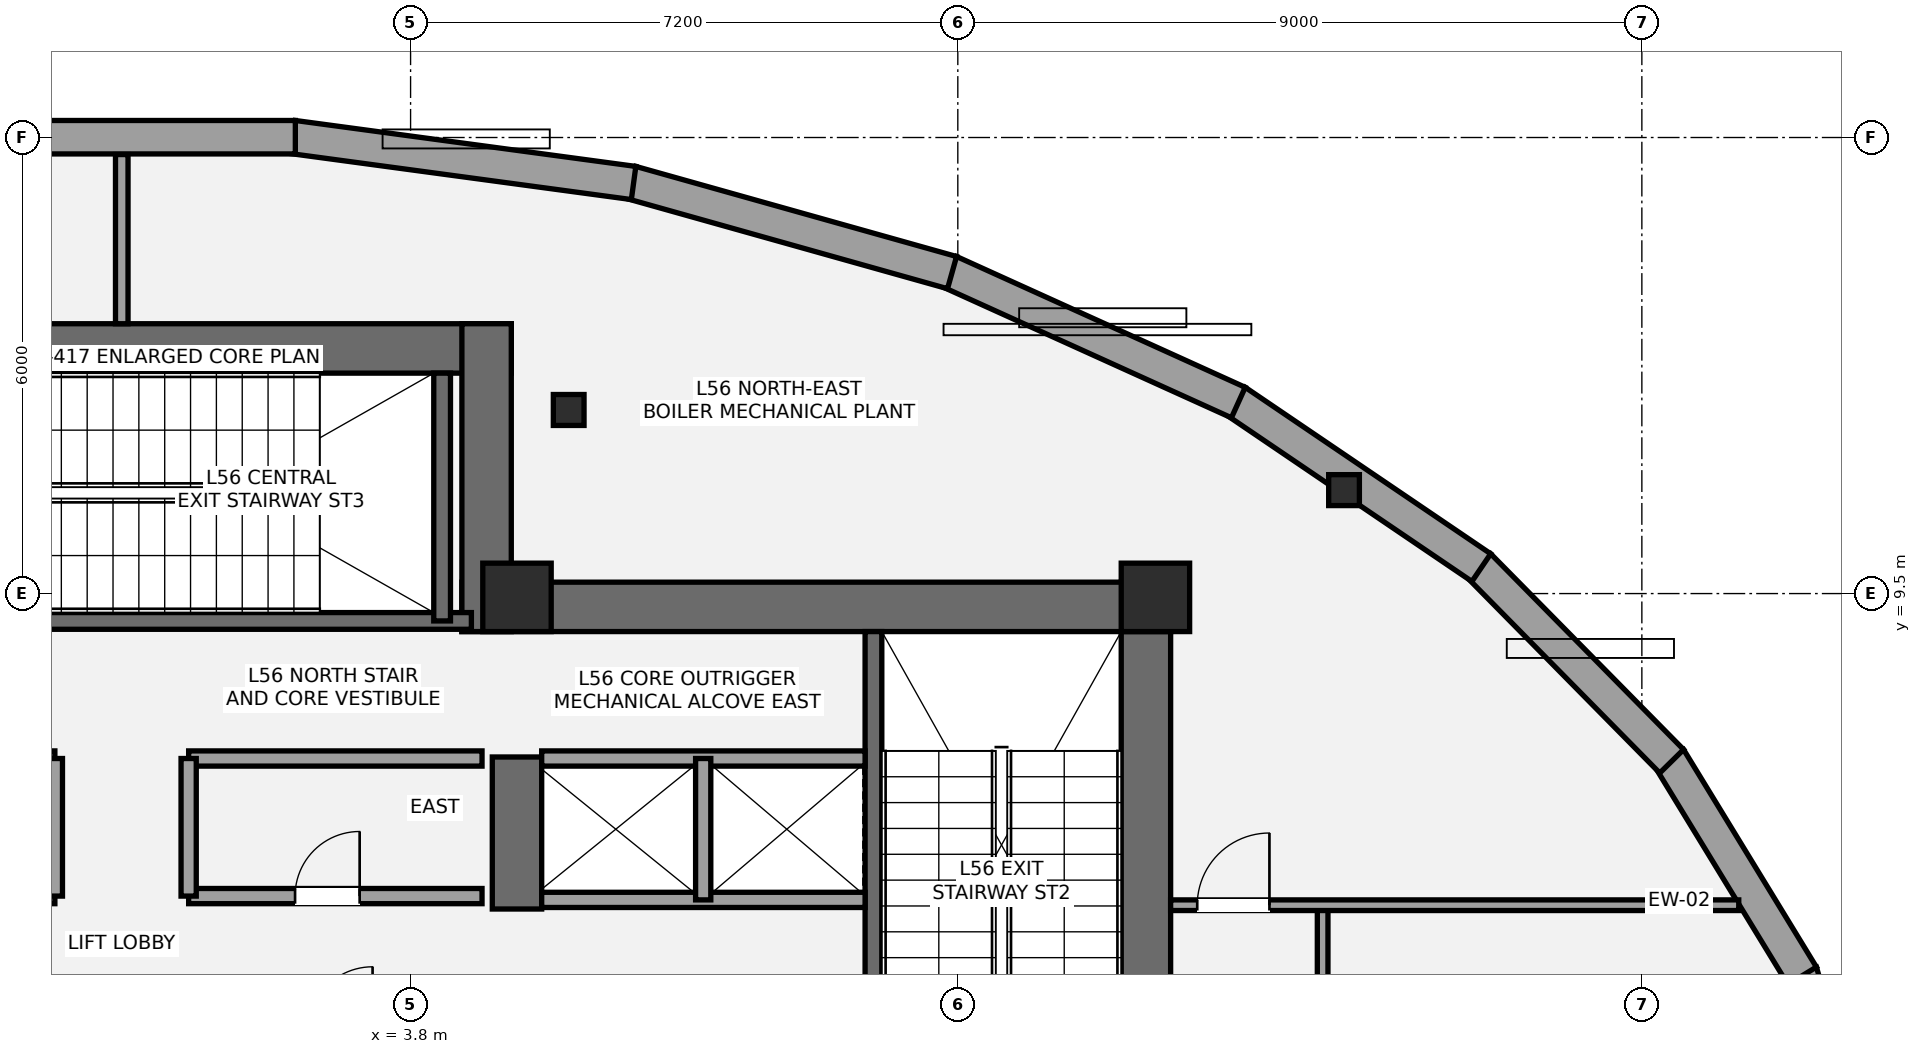
"""IFC4 building model, lengths in metres.
Left out: names, types, materials, properties, quantities, classifications, styles, units other than length and angle.
Written with IfcOpenShell. Run it as: python <this file> out.ifc"""

import sys

from ifc_helpers import new_model, si_unit, direction, frame, frame_2d, origin, origin_2d, place, context, subcontext, project, spatial, rectangle, i_section, extrude, element, fill, save


model = new_model("IFC4")
c1 = context("Model", 3, precision=1e-05, world=origin(), true_north=direction((0.0, 1.0)))
c2 = subcontext(c1, "Body", "Model", "MODEL_VIEW")
j1 = project(units=[si_unit("LENGTHUNIT", "METRE"), si_unit("PLANEANGLEUNIT", "RADIAN")], contexts=[c1])
p1 = place(None, origin())
s1 = spatial("IfcSite", under=j1, at=p1, CompositionType="ELEMENT")
p2 = place(p1, origin())
s2 = spatial("IfcBuilding", under=s1, at=p2, CompositionType="ELEMENT")
p3 = place(p2, frame((0.0, 0.0, 201.4)))
s3 = spatial("IfcBuildingStorey", under=s2, at=p3, CompositionType="ELEMENT", Elevation=201.4)
p4 = place(p3, frame((13.475, 1.2, 0.0), z_axis=(0.0, 0.0, 1.0), x_axis=(0.0, 1.0, 0.0)))
e1 = element("IfcWall", 1, at=p4, inside=s3, PredefinedType="SHEAR", context=c2, shape_type="SweptSolid", body=[
    extrude(rectangle(XDim=8.45, YDim=0.65, at=frame_2d((4.225, 0.0))), origin(), (0.0, 0.0, 1.0), 4.5),
])
p5 = place(p3, frame((4.475, 9.325, 0.0), z_axis=(0.0, 0.0, 1.0), x_axis=(1.0, 0.0, 0.0)))
e2 = element("IfcWall", 2, at=p5, inside=s3, PredefinedType="SHEAR", context=c2, shape_type="SweptSolid", body=[
    extrude(rectangle(XDim=9.325, YDim=0.65, at=frame_2d((4.663, 0.0))), origin(), (0.0, 0.0, 1.0), 4.5),
])
p6 = place(p3, frame((5.2, 5.35, 0.0), z_axis=(0.0, 0.0, 1.0), x_axis=(0.0, 1.0, 0.0)))
e3 = element("IfcWall", 3, at=p6, inside=s3, PredefinedType="SHEAR", context=c2, shape_type="SweptSolid", body=[
    extrude(rectangle(XDim=2.0, YDim=0.65, at=frame_2d((1.0, 0.0))), origin(), (0.0, 0.0, 1.0), 4.5),
])
p7 = place(p3, frame((9.89, 1.85, 0.0), z_axis=(0.0, 0.0, 1.0), x_axis=(0.0, 1.0, 0.0)))
e4 = element("IfcWall", 4, at=p7, inside=s3, PredefinedType="SHEAR", context=c2, shape_type="SweptSolid", body=[
    extrude(rectangle(XDim=7.15, YDim=0.22, at=frame_2d((3.575, 0.0))), origin(), (0.0, 0.0, 1.0), 4.5),
])
p8 = place(p3, frame((-5.125, 12.725, 0.0), z_axis=(0.0, 0.0, 1.0), x_axis=(1.0, 0.0, 0.0)))
e5 = element("IfcWall", 5, at=p8, inside=s3, PredefinedType="SHEAR", context=c2, shape_type="SweptSolid", body=[
    extrude(rectangle(XDim=10.25, YDim=0.65, at=frame_2d((5.125, 0.0))), origin(), (0.0, 0.0, 1.0), 4.5),
])
p9 = place(p3, frame((4.8, 9.0, 0.0), z_axis=(0.0, 0.0, 1.0), x_axis=(0.0, 1.0, 0.0)))
e6 = element("IfcWall", 6, at=p9, inside=s3, PredefinedType="SHEAR", context=c2, shape_type="SweptSolid", body=[
    extrude(rectangle(XDim=4.05, YDim=0.65, at=frame_2d((2.025, 0.0))), origin(), (0.0, 0.0, 1.0), 4.5),
])
p10 = place(p3, frame((-4.7, 9.14, 0.0), z_axis=(0.0, 0.0, 1.0), x_axis=(1.0, 0.0, 0.0)))
e7 = element("IfcWall", 7, at=p10, inside=s3, PredefinedType="SHEAR", context=c2, shape_type="SweptSolid", body=[
    extrude(rectangle(XDim=9.3, YDim=0.22, at=frame_2d((4.65, 0.0))), origin(), (0.0, 0.0, 1.0), 4.5),
])
p11 = place(p10, frame((2.23, 0.0, 0.0)))
e8 = element("IfcOpeningElement", 8, at=p11, cuts=e7, PredefinedType="OPENING", context=c2, shape_type="SweptSolid", body=[
    extrude(rectangle(XDim=1.05, YDim=2.15, at=frame_2d((0.525, 1.075))), frame((0.0, 0.12, 0.0), z_axis=(0.0, -1.0, 0.0), x_axis=(1.0, 0.0, 0.0)), (0.0, 0.0, 1.0), 0.24),
])
p12 = place(p3, frame((4.215, 9.14, 0.0), z_axis=(0.0, 0.0, 1.0), x_axis=(0.0, 1.0, 0.0)))
e9 = element("IfcWall", 9, at=p12, inside=s3, PredefinedType="SHEAR", context=c2, shape_type="SweptSolid", body=[
    extrude(rectangle(XDim=3.26, YDim=0.22, at=frame_2d((1.63, 0.0))), origin(), (0.0, 0.0, 1.0), 4.5),
])
for number, where, z_axis, x_axis in (
    (10, (5.2, 9.45, 0.0), (0.0, 0.0, 1.0), (1.0, 0.0, 0.0)),
    (11, (13.6, 9.45, 0.0), (0.0, 0.0, 1.0), (1.0, 0.0, 0.0)),
):
    element("IfcColumn", number, at=place(p3, frame(where, z_axis=z_axis, x_axis=x_axis)), inside=s3, PredefinedType="COLUMN", context=c2, shape_type="SweptSolid", body=[
        extrude(rectangle(XDim=0.9, YDim=0.9, at=origin_2d()), origin(), (0.0, 0.0, 1.0), 4.5),
    ])
for number, where, z_axis, x_axis in (
    (12, (16.082, 10.861, 0.0), (0.0, 0.0, 1.0), (1.0, 0.0, 0.0)),
    (13, (5.88, 11.915, 0.0), (0.0, 0.0, 1.0), (1.0, 0.0, 0.0)),
):
    element("IfcColumn", number, at=place(p3, frame(where, z_axis=z_axis, x_axis=x_axis)), inside=s3, PredefinedType="COLUMN", context=c2, shape_type="SweptSolid", body=[
        extrude(i_section(OverallWidth=0.404, OverallDepth=0.407, WebThickness=0.027, FlangeThickness=0.044, at=origin_2d()), origin(), (0.0, 0.0, 1.0), 4.5),
    ])
p13 = place(p3, frame((22.086, 4.525, 0.0), z_axis=(0.0, 0.0, 1.0), x_axis=(0.281477355005, -0.959567870773, 0.0)))
e14 = element("IfcWall", 14, at=p13, inside=s3, PredefinedType="STANDARD", context=c2, shape_type="SweptSolid", body=[
    extrude(rectangle(XDim=3.166, YDim=0.44, at=frame_2d((1.583, 0.0))), origin(), (0.0, 0.0, 1.0), 3.575),
])
p14 = place(p3, frame((20.361, 7.333, 0.0), z_axis=(0.0, 0.0, 1.0), x_axis=(0.521214394333, -0.853425775999, 0.0)))
e15 = element("IfcWall", 15, at=p14, inside=s3, PredefinedType="STANDARD", context=c2, shape_type="SweptSolid", body=[
    extrude(rectangle(XDim=3.353, YDim=0.44, at=frame_2d((1.677, 0.0))), origin(), (0.0, 0.0, 1.0), 3.575),
])
p15 = place(p3, frame((17.854, 9.869, 0.0), z_axis=(0.0, 0.0, 1.0), x_axis=(0.701887992659, -0.712287333708, 0.0)))
e16 = element("IfcWall", 16, at=p15, inside=s3, PredefinedType="STANDARD", context=c2, shape_type="SweptSolid", body=[
    extrude(rectangle(XDim=3.615, YDim=0.44, at=frame_2d((1.808, 0.0))), origin(), (0.0, 0.0, 1.0), 3.575),
])
p16 = place(p3, frame((14.658, 12.031, 0.0), z_axis=(0.0, 0.0, 1.0), x_axis=(0.827644957237, -0.561252015373, 0.0)))
e17 = element("IfcWall", 17, at=p16, inside=s3, PredefinedType="STANDARD", context=c2, shape_type="SweptSolid", body=[
    extrude(rectangle(XDim=3.902, YDim=0.44, at=frame_2d((1.951, 0.0))), origin(), (0.0, 0.0, 1.0), 3.575),
])
p17 = place(p3, frame((10.893, 13.734, 0.0), z_axis=(0.0, 0.0, 1.0), x_axis=(0.910881102331, -0.412668895624, 0.0)))
e18 = element("IfcWall", 18, at=p17, inside=s3, PredefinedType="STANDARD", context=c2, shape_type="SweptSolid", body=[
    extrude(rectangle(XDim=4.17, YDim=0.44, at=frame_2d((2.085, 0.0))), origin(), (0.0, 0.0, 1.0), 3.575),
])
p18 = place(p3, frame((6.704, 14.908, 0.0), z_axis=(0.0, 0.0, 1.0), x_axis=(0.962743881764, -0.270414899969, 0.0)))
e19 = element("IfcWall", 19, at=p18, inside=s3, PredefinedType="STANDARD", context=c2, shape_type="SweptSolid", body=[
    extrude(rectangle(XDim=4.383, YDim=0.44, at=frame_2d((2.192, 0.0))), origin(), (0.0, 0.0, 1.0), 3.575),
])
p19 = place(p3, frame((2.254, 15.506, 0.0), z_axis=(0.0, 0.0, 1.0), x_axis=(0.991025333234, -0.133674189316, 0.0)))
e20 = element("IfcWall", 20, at=p19, inside=s3, PredefinedType="STANDARD", context=c2, shape_type="SweptSolid", body=[
    extrude(rectangle(XDim=4.52, YDim=0.44, at=frame_2d((2.26, 0.0))), origin(), (0.0, 0.0, 1.0), 3.575),
])
p20 = place(p3, frame((-2.284, 15.504, 0.0), z_axis=(0.0, 0.0, 1.0), x_axis=(1.0, 0.0, 0.0)))
e21 = element("IfcWall", 21, at=p20, inside=s3, PredefinedType="STANDARD", context=c2, shape_type="SweptSolid", body=[
    extrude(rectangle(XDim=4.567, YDim=0.44, at=frame_2d((2.284, 0.0))), origin(), (0.0, 0.0, 1.0), 3.575),
])
for number, where, z_axis, x_axis in (
    (22, (5.525, 5.47, 0.0), (0.0, 0.0, 1.0), (1.0, 0.0, 0.0)),
    (23, (5.525, 7.33, 0.0), (0.0, 0.0, 1.0), (1.0, 0.0, 0.0)),
):
    element("IfcWall", number, at=place(p3, frame(where, z_axis=z_axis, x_axis=x_axis)), inside=s3, PredefinedType="SOLIDWALL", context=c2, shape_type="SweptSolid", body=[
        extrude(rectangle(XDim=4.255, YDim=0.2, at=frame_2d((2.127, 0.0))), origin(), (0.0, 0.0, 1.0), 4.28),
    ])
p21 = place(p3, frame((7.65, 5.47, 0.0), z_axis=(0.0, 0.0, 1.0), x_axis=(0.0, 1.0, 0.0)))
e24 = element("IfcWall", 24, at=p21, inside=s3, PredefinedType="SOLIDWALL", context=c2, shape_type="SweptSolid", body=[
    extrude(rectangle(XDim=1.86, YDim=0.2, at=frame_2d((0.93, 0.0))), origin(), (0.0, 0.0, 1.0), 4.28),
])
p22 = place(p3, frame((-4.74, 5.52, 0.0), z_axis=(0.0, 0.0, 1.0), x_axis=(1.0, 0.0, 0.0)))
e25 = element("IfcWall", 25, at=p22, inside=s3, PredefinedType="SOLIDWALL", context=c2, shape_type="SweptSolid", body=[
    extrude(rectangle(XDim=3.86, YDim=0.2, at=frame_2d((1.93, 0.0))), origin(), (0.0, 0.0, 1.0), 4.28),
])
p23 = place(p22, frame((1.4, 0.0, 0.0)))
e26 = element("IfcOpeningElement", 26, at=p23, cuts=e25, PredefinedType="OPENING", context=c2, shape_type="SweptSolid", body=[
    extrude(rectangle(XDim=0.85, YDim=2.1, at=frame_2d((0.425, 1.05))), frame((0.0, 0.11, 0.0), z_axis=(0.0, -1.0, 0.0), x_axis=(1.0, 0.0, 0.0)), (0.0, 0.0, 1.0), 0.22),
])
p24 = place(p3, frame((0.88, 5.52, 0.0), z_axis=(0.0, 0.0, 1.0), x_axis=(1.0, 0.0, 0.0)))
e27 = element("IfcWall", 27, at=p24, inside=s3, PredefinedType="SOLIDWALL", context=c2, shape_type="SweptSolid", body=[
    extrude(rectangle(XDim=3.86, YDim=0.2, at=frame_2d((1.93, 0.0))), origin(), (0.0, 0.0, 1.0), 4.28),
])
p25 = place(p24, frame((1.4, 0.0, 0.0)))
e28 = element("IfcOpeningElement", 28, at=p25, cuts=e27, PredefinedType="OPENING", context=c2, shape_type="SweptSolid", body=[
    extrude(rectangle(XDim=0.85, YDim=2.1, at=frame_2d((0.425, 1.05))), frame((0.0, 0.11, 0.0), z_axis=(0.0, -1.0, 0.0), x_axis=(1.0, 0.0, 0.0)), (0.0, 0.0, 1.0), 0.22),
])
for number, where, z_axis, x_axis in (
    (29, (-4.74, 7.33, 0.0), (0.0, 0.0, 1.0), (1.0, 0.0, 0.0)),
    (30, (0.88, 7.33, 0.0), (0.0, 0.0, 1.0), (1.0, 0.0, 0.0)),
):
    element("IfcWall", number, at=place(p3, frame(where, z_axis=z_axis, x_axis=x_axis)), inside=s3, PredefinedType="SOLIDWALL", context=c2, shape_type="SweptSolid", body=[
        extrude(rectangle(XDim=3.86, YDim=0.2, at=frame_2d((1.93, 0.0))), origin(), (0.0, 0.0, 1.0), 4.28),
    ])
for number, where, z_axis, x_axis in (
    (31, (-0.88, 5.52, 0.0), (0.0, 0.0, 1.0), (0.0, 1.0, 0.0)),
    (32, (0.88, 5.52, 0.0), (0.0, 0.0, 1.0), (0.0, 1.0, 0.0)),
):
    element("IfcWall", number, at=place(p3, frame(where, z_axis=z_axis, x_axis=x_axis)), inside=s3, PredefinedType="SOLIDWALL", context=c2, shape_type="SweptSolid", body=[
        extrude(rectangle(XDim=1.81, YDim=0.2, at=frame_2d((0.905, 0.0))), origin(), (0.0, 0.0, 1.0), 4.28),
    ])
p26 = place(p3, frame((15.8, -6.85, 0.0), z_axis=(0.0, 0.0, 1.0), x_axis=(0.0, 1.0, 0.0)))
e33 = element("IfcWall", 33, at=p26, inside=s3, PredefinedType="PARTITIONING", context=c2, shape_type="SweptSolid", body=[
    extrude(rectangle(XDim=12.25, YDim=0.14, at=frame_2d((6.125, 0.0))), origin(), (0.0, 0.0, 1.0), 2.47),
])
p27 = place(p26, frame((0.35, 0.0, 0.0)))
e34 = element("IfcOpeningElement", 34, at=p27, cuts=e33, PredefinedType="OPENING", context=c2, shape_type="SweptSolid", body=[
    extrude(rectangle(XDim=0.95, YDim=2.15, at=frame_2d((0.475, 1.075))), frame((0.0, 0.08, 0.0), z_axis=(0.0, -1.0, 0.0), x_axis=(1.0, 0.0, 0.0)), (0.0, 0.0, 1.0), 0.16),
])
p28 = place(p26, frame((2.86, 0.0, 0.0)))
e35 = element("IfcOpeningElement", 35, at=p28, cuts=e33, PredefinedType="OPENING", context=c2, shape_type="SweptSolid", body=[
    extrude(rectangle(XDim=0.95, YDim=2.15, at=frame_2d((0.475, 1.075))), frame((0.0, 0.08, 0.0), z_axis=(0.0, -1.0, 0.0), x_axis=(1.0, 0.0, 0.0)), (0.0, 0.0, 1.0), 0.16),
])
p29 = place(p3, frame((13.8, 5.4, 0.0), z_axis=(0.0, 0.0, 1.0), x_axis=(1.0, 0.0, 0.0)))
e36 = element("IfcWall", 36, at=p29, inside=s3, PredefinedType="PARTITIONING", context=c2, shape_type="SweptSolid", body=[
    extrude(rectangle(XDim=7.475, YDim=0.14, at=frame_2d((3.737, 0.0))), origin(), (0.0, 0.0, 1.0), 4.28),
])
p30 = place(p29, frame((0.35, 0.0, 0.0)))
e37 = element("IfcOpeningElement", 37, at=p30, cuts=e36, PredefinedType="OPENING", context=c2, shape_type="SweptSolid", body=[
    extrude(rectangle(XDim=0.95, YDim=2.15, at=frame_2d((0.475, 1.075))), frame((0.0, 0.08, 0.0), z_axis=(0.0, -1.0, 0.0), x_axis=(1.0, 0.0, 0.0)), (0.0, 0.0, 1.0), 0.16),
])
p31 = place(p3, frame((0.0, 13.05, 0.0), z_axis=(0.0, 0.0, 1.0), x_axis=(0.0, 1.0, 0.0)))
e38 = element("IfcWall", 38, at=p31, inside=s3, PredefinedType="PARTITIONING", context=c2, shape_type="SweptSolid", body=[
    extrude(rectangle(XDim=2.226, YDim=0.165, at=frame_2d((1.113, 0.0))), origin(), (0.0, 0.0, 1.0), 4.28),
])
p32 = place(p25, origin())
e39 = element("IfcDoor", 39, at=p32, inside=s3, OperationType="SINGLE_SWING_RIGHT", PredefinedType="DOOR", context=c2, shape_type="SweptSolid", body=[
    extrude(rectangle(XDim=0.85, YDim=2.1, at=frame_2d((0.425, 1.05))), frame((0.0, 0.025, 0.0), z_axis=(0.0, -1.0, 0.0), x_axis=(1.0, 0.0, 0.0)), (0.0, 0.0, 1.0), 0.05),
])
fill(e28, e39)
p33 = place(p30, origin())
e40 = element("IfcDoor", 40, at=p33, inside=s3, OperationType="SINGLE_SWING_RIGHT", PredefinedType="DOOR", context=c2, shape_type="SweptSolid", body=[
    extrude(rectangle(XDim=0.95, YDim=2.15, at=frame_2d((0.475, 1.075))), frame((0.0, 0.025, 0.0), z_axis=(0.0, -1.0, 0.0), x_axis=(1.0, 0.0, 0.0)), (0.0, 0.0, 1.0), 0.05),
])
fill(e37, e40)
save(model, sys.argv[1])
